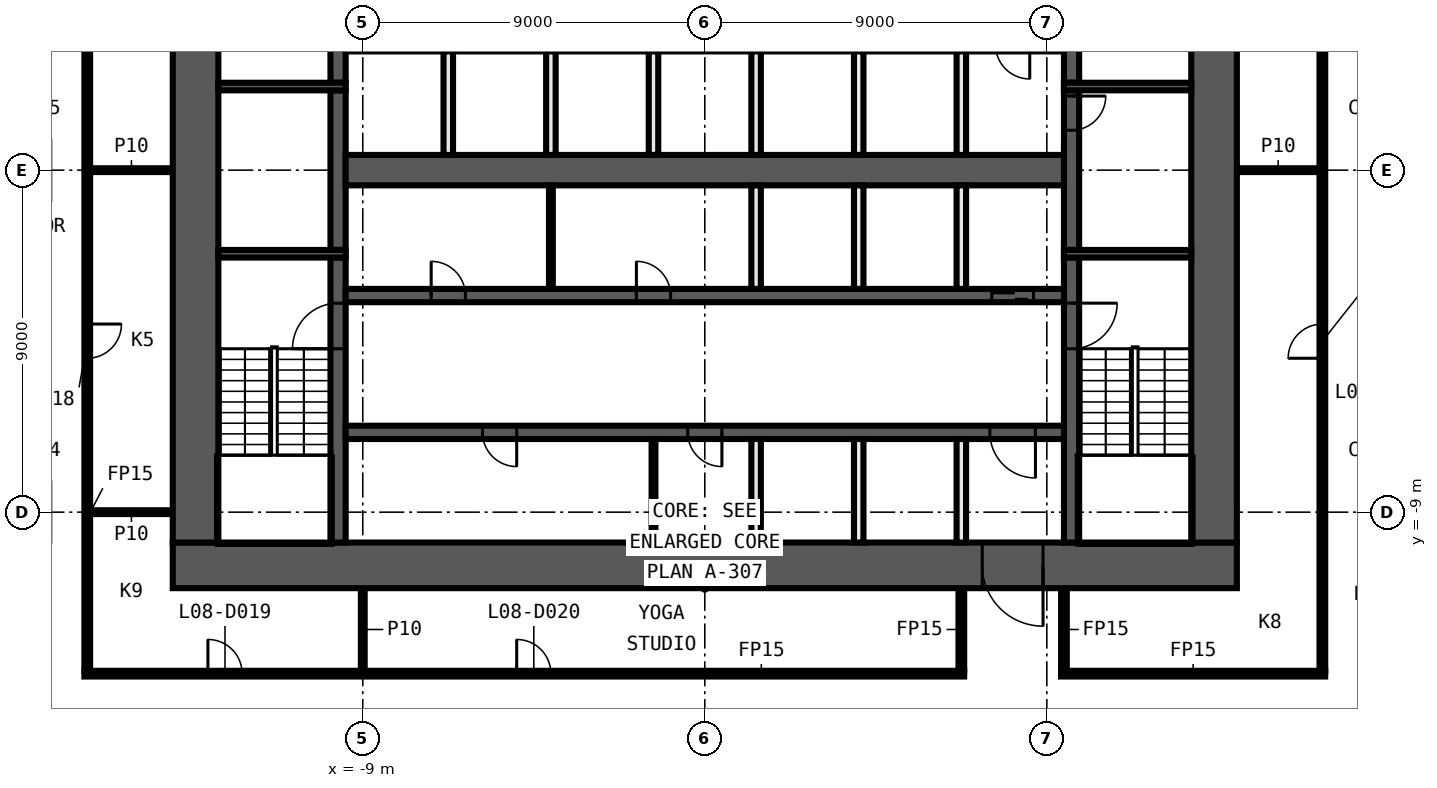
"""IFC4 building model, lengths in metres.
Left out: names, types, materials, properties, quantities, classifications, styles, units other than length and angle.
Written with IfcOpenShell. Run it as: python <this file> out.ifc"""

import sys

from ifc_helpers import new_model, si_unit, direction, frame, frame_2d, origin, place, context, subcontext, project, spatial, rectangle, extrude, element, fill, save


model = new_model("IFC4")
c1 = context("Model", 3, precision=1e-05, world=origin(), true_north=direction((0.0, 1.0)))
c2 = subcontext(c1, "Body", "Model", "MODEL_VIEW")
j1 = project(units=[si_unit("LENGTHUNIT", "METRE"), si_unit("PLANEANGLEUNIT", "RADIAN")], contexts=[c1])
p1 = place(None, origin())
s1 = spatial("IfcSite", under=j1, at=p1, CompositionType="ELEMENT")
p2 = place(p1, origin())
s2 = spatial("IfcBuilding", under=s1, at=p2, CompositionType="ELEMENT")
p3 = place(p2, frame((0.0, 0.0, 51.4)))
s3 = spatial("IfcBuildingStorey", under=s2, at=p3, CompositionType="ELEMENT", Elevation=51.4)
p4 = place(p3, frame((-16.325, -13.25, 0.0), z_axis=(0.0, 0.0, 1.0), x_axis=(1.0, 0.0, 0.0)))
e1 = element("IfcWall", 1, at=p4, inside=s3, PredefinedType="PARTITIONING", context=c2, shape_type="SweptSolid", body=[
    extrude(rectangle(XDim=23.15, YDim=0.15, at=frame_2d((11.575, 0.0))), origin(), (0.0, 0.0, 1.0), 3.3),
])
p5 = place(p4, frame((3.25, 0.0, 0.0)))
e2 = element("IfcOpeningElement", 2, at=p5, cuts=e1, PredefinedType="OPENING", context=c2, shape_type="SweptSolid", body=[
    extrude(rectangle(XDim=0.9, YDim=2.1, at=frame_2d((0.45, 1.05))), frame((0.0, 0.085, 0.0), z_axis=(0.0, -1.0, 0.0), x_axis=(1.0, 0.0, 0.0)), (0.0, 0.0, 1.0), 0.17),
])
p6 = place(p4, frame((11.375, 0.0, 0.0)))
e3 = element("IfcOpeningElement", 3, at=p6, cuts=e1, PredefinedType="OPENING", context=c2, shape_type="SweptSolid", body=[
    extrude(rectangle(XDim=0.9, YDim=2.1, at=frame_2d((0.45, 1.05))), frame((0.0, 0.085, 0.0), z_axis=(0.0, -1.0, 0.0), x_axis=(1.0, 0.0, 0.0)), (0.0, 0.0, 1.0), 0.17),
])
p7 = place(p3, frame((9.375, -13.25, 0.0), z_axis=(0.0, 0.0, 1.0), x_axis=(1.0, 0.0, 0.0)))
e4 = element("IfcWall", 4, at=p7, inside=s3, PredefinedType="PARTITIONING", context=c2, shape_type="SweptSolid", body=[
    extrude(rectangle(XDim=6.95, YDim=0.15, at=frame_2d((3.475, 0.0))), origin(), (0.0, 0.0, 1.0), 3.3),
])
for number, where, z_axis, x_axis in (
    (5, (-16.175, -9.0, 0.0), (0.0, 0.0, 1.0), (1.0, 0.0, 0.0)),
    (6, (-16.175, 0.0, 0.0), (0.0, 0.0, 1.0), (1.0, 0.0, 0.0)),
    (7, (14.0, 0.0, 0.0), (0.0, 0.0, 1.0), (1.0, 0.0, 0.0)),
):
    element("IfcWall", number, at=place(p3, frame(where, z_axis=z_axis, x_axis=x_axis)), inside=s3, PredefinedType="PARTITIONING", context=c2, shape_type="SweptSolid", body=[
        extrude(rectangle(XDim=2.175, YDim=0.1, at=frame_2d((1.087, 0.0))), origin(), (0.0, 0.0, 1.0), 3.3),
    ])
p8 = place(p3, frame((16.25, -13.175, 0.0), z_axis=(0.0, 0.0, 1.0), x_axis=(0.0, 1.0, 0.0)))
e8 = element("IfcWall", 8, at=p8, inside=s3, PredefinedType="PARTITIONING", context=c2, shape_type="SweptSolid", body=[
    extrude(rectangle(XDim=26.35, YDim=0.15, at=frame_2d((13.175, 0.0))), origin(), (0.0, 0.0, 1.0), 3.3),
])
p9 = place(p8, frame((8.225, 0.0, 0.0)))
e9 = element("IfcOpeningElement", 9, at=p9, cuts=e8, PredefinedType="OPENING", context=c2, shape_type="SweptSolid", body=[
    extrude(rectangle(XDim=0.9, YDim=2.1, at=frame_2d((0.45, 1.05))), frame((0.0, 0.085, 0.0), z_axis=(0.0, -1.0, 0.0), x_axis=(1.0, 0.0, 0.0)), (0.0, 0.0, 1.0), 0.17),
])
p10 = place(p8, frame((17.225, 0.0, 0.0)))
e10 = element("IfcOpeningElement", 10, at=p10, cuts=e8, PredefinedType="OPENING", context=c2, shape_type="SweptSolid", body=[
    extrude(rectangle(XDim=0.9, YDim=2.1, at=frame_2d((0.45, 1.05))), frame((0.0, 0.085, 0.0), z_axis=(0.0, -1.0, 0.0), x_axis=(1.0, 0.0, 0.0)), (0.0, 0.0, 1.0), 0.17),
])
for number, where, z_axis, x_axis in (
    (11, (9.45, -13.175, 0.0), (0.0, 0.0, 1.0), (0.0, 1.0, 0.0)),
    (12, (6.75, -13.175, 0.0), (0.0, 0.0, 1.0), (0.0, 1.0, 0.0)),
):
    element("IfcWall", number, at=place(p3, frame(where, z_axis=z_axis, x_axis=x_axis)), inside=s3, PredefinedType="PARTITIONING", context=c2, shape_type="SweptSolid", body=[
        extrude(rectangle(XDim=2.175, YDim=0.15, at=frame_2d((1.087, 0.0))), origin(), (0.0, 0.0, 1.0), 3.3),
    ])
p11 = place(p3, frame((-9.0, -13.175, 0.0), z_axis=(0.0, 0.0, 1.0), x_axis=(0.0, 1.0, 0.0)))
e13 = element("IfcWall", 13, at=p11, inside=s3, PredefinedType="PARTITIONING", context=c2, shape_type="SweptSolid", body=[
    extrude(rectangle(XDim=2.175, YDim=0.1, at=frame_2d((1.087, 0.0))), origin(), (0.0, 0.0, 1.0), 3.3),
])
p12 = place(p3, frame((-16.25, 13.175, 0.0), z_axis=(0.0, 0.0, 1.0), x_axis=(0.0, -1.0, 0.0)))
e14 = element("IfcWall", 14, at=p12, inside=s3, PredefinedType="PARTITIONING", context=c2, shape_type="SweptSolid", body=[
    extrude(rectangle(XDim=26.35, YDim=0.15, at=frame_2d((13.175, 0.0))), origin(), (0.0, 0.0, 1.0), 3.3),
])
p13 = place(p12, frame((17.225, 0.0, 0.0)))
e15 = element("IfcOpeningElement", 15, at=p13, cuts=e14, PredefinedType="OPENING", context=c2, shape_type="SweptSolid", body=[
    extrude(rectangle(XDim=0.9, YDim=2.1, at=frame_2d((0.45, 1.05))), frame((0.0, 0.085, 0.0), z_axis=(0.0, -1.0, 0.0), x_axis=(1.0, 0.0, 0.0)), (0.0, 0.0, 1.0), 0.17),
])
p14 = place(p12, frame((8.225, 0.0, 0.0)))
e16 = element("IfcOpeningElement", 16, at=p14, cuts=e14, PredefinedType="OPENING", context=c2, shape_type="SweptSolid", body=[
    extrude(rectangle(XDim=0.9, YDim=2.1, at=frame_2d((0.45, 1.05))), frame((0.0, 0.085, 0.0), z_axis=(0.0, -1.0, 0.0), x_axis=(1.0, 0.0, 0.0)), (0.0, 0.0, 1.0), 0.17),
])
p15 = place(p3, frame((14.0, -10.4, 0.0), z_axis=(0.0, 0.0, 1.0), x_axis=(-1.0, 0.0, 0.0)))
e17 = element("IfcWall", 17, at=p15, inside=s3, PredefinedType="SHEAR", context=c2, shape_type="SweptSolid", body=[
    extrude(rectangle(XDim=28.0, YDim=1.2, at=frame_2d((14.0, 0.0))), origin(), (0.0, 0.0, 1.0), 3.3),
])
p16 = place(p15, frame((5.1, 0.0, 0.0)))
e18 = element("IfcOpeningElement", 18, at=p16, cuts=e17, PredefinedType="OPENING", context=c2, shape_type="SweptSolid", body=[
    extrude(rectangle(XDim=1.6, YDim=2.1, at=frame_2d((0.8, 1.05))), frame((0.0, 0.61, 0.0), z_axis=(0.0, -1.0, 0.0), x_axis=(1.0, 0.0, 0.0)), (0.0, 0.0, 1.0), 1.22),
])
for number, where, z_axis, x_axis in (
    (19, (13.4, 9.8, 0.0), (0.0, 0.0, 1.0), (0.0, -1.0, 0.0)),
    (20, (-13.4, -9.8, 0.0), (0.0, 0.0, 1.0), (0.0, 1.0, 0.0)),
):
    element("IfcWall", number, at=place(p3, frame(where, z_axis=z_axis, x_axis=x_axis)), inside=s3, PredefinedType="SHEAR", context=c2, shape_type="SweptSolid", body=[
        extrude(rectangle(XDim=19.6, YDim=1.2, at=frame_2d((9.8, 0.0))), origin(), (0.0, 0.0, 1.0), 3.3),
    ])
p17 = place(p3, frame((9.65, -2.3, 0.0), z_axis=(0.0, 0.0, 1.0), x_axis=(0.0, -1.0, 0.0)))
e21 = element("IfcWall", 21, at=p17, inside=s3, PredefinedType="SHEAR", context=c2, shape_type="SweptSolid", body=[
    extrude(rectangle(XDim=7.5, YDim=0.4, at=frame_2d((3.75, 0.0))), origin(), (0.0, 0.0, 1.0), 3.3),
])
p18 = place(p17, frame((1.2, 0.0, 0.0)))
e22 = element("IfcOpeningElement", 22, at=p18, cuts=e21, PredefinedType="OPENING", context=c2, shape_type="SweptSolid", body=[
    extrude(rectangle(XDim=1.2, YDim=2.1, at=frame_2d((0.6, 1.05))), frame((0.0, 0.21, 0.0), z_axis=(0.0, -1.0, 0.0), x_axis=(1.0, 0.0, 0.0)), (0.0, 0.0, 1.0), 0.42),
])
p19 = place(p3, frame((9.65, 2.1, 0.0), z_axis=(0.0, 0.0, 1.0), x_axis=(0.0, -1.0, 0.0)))
e23 = element("IfcWall", 23, at=p19, inside=s3, PredefinedType="SHEAR", context=c2, shape_type="SweptSolid", body=[
    extrude(rectangle(XDim=4.2, YDim=0.4, at=frame_2d((2.1, 0.0))), origin(), (0.0, 0.0, 1.0), 3.3),
])
p20 = place(p19, frame((0.15, 0.0, 0.0)))
e24 = element("IfcOpeningElement", 24, at=p20, cuts=e23, PredefinedType="OPENING", context=c2, shape_type="SweptSolid", body=[
    extrude(rectangle(XDim=0.9, YDim=2.1, at=frame_2d((0.45, 1.05))), frame((0.0, 0.21, 0.0), z_axis=(0.0, -1.0, 0.0), x_axis=(1.0, 0.0, 0.0)), (0.0, 0.0, 1.0), 0.42),
])
p21 = place(p3, frame((9.65, 9.8, 0.0), z_axis=(0.0, 0.0, 1.0), x_axis=(0.0, -1.0, 0.0)))
e25 = element("IfcWall", 25, at=p21, inside=s3, PredefinedType="SHEAR", context=c2, shape_type="SweptSolid", body=[
    extrude(rectangle(XDim=7.5, YDim=0.4, at=frame_2d((3.75, 0.0))), origin(), (0.0, 0.0, 1.0), 3.3),
])
p22 = place(p21, frame((5.1, 0.0, 0.0)))
e26 = element("IfcOpeningElement", 26, at=p22, cuts=e25, PredefinedType="OPENING", context=c2, shape_type="SweptSolid", body=[
    extrude(rectangle(XDim=1.2, YDim=2.1, at=frame_2d((0.6, 1.05))), frame((0.0, 0.21, 0.0), z_axis=(0.0, -1.0, 0.0), x_axis=(1.0, 0.0, 0.0)), (0.0, 0.0, 1.0), 0.42),
])
p23 = place(p3, frame((-9.65, -9.8, 0.0), z_axis=(0.0, 0.0, 1.0), x_axis=(0.0, 1.0, 0.0)))
e27 = element("IfcWall", 27, at=p23, inside=s3, PredefinedType="SHEAR", context=c2, shape_type="SweptSolid", body=[
    extrude(rectangle(XDim=7.5, YDim=0.4, at=frame_2d((3.75, 0.0))), origin(), (0.0, 0.0, 1.0), 3.3),
])
p24 = place(p23, frame((5.1, 0.0, 0.0)))
e28 = element("IfcOpeningElement", 28, at=p24, cuts=e27, PredefinedType="OPENING", context=c2, shape_type="SweptSolid", body=[
    extrude(rectangle(XDim=1.2, YDim=2.1, at=frame_2d((0.6, 1.05))), frame((0.0, 0.21, 0.0), z_axis=(0.0, -1.0, 0.0), x_axis=(1.0, 0.0, 0.0)), (0.0, 0.0, 1.0), 0.42),
])
p25 = place(p3, frame((-9.65, -2.1, 0.0), z_axis=(0.0, 0.0, 1.0), x_axis=(0.0, 1.0, 0.0)))
e29 = element("IfcWall", 29, at=p25, inside=s3, PredefinedType="SHEAR", context=c2, shape_type="SweptSolid", body=[
    extrude(rectangle(XDim=4.2, YDim=0.4, at=frame_2d((2.1, 0.0))), origin(), (0.0, 0.0, 1.0), 3.3),
])
p26 = place(p3, frame((-9.65, 2.3, 0.0), z_axis=(0.0, 0.0, 1.0), x_axis=(0.0, 1.0, 0.0)))
e30 = element("IfcWall", 30, at=p26, inside=s3, PredefinedType="SHEAR", context=c2, shape_type="SweptSolid", body=[
    extrude(rectangle(XDim=7.5, YDim=0.4, at=frame_2d((3.75, 0.0))), origin(), (0.0, 0.0, 1.0), 3.3),
])
p27 = place(p26, frame((1.2, 0.0, 0.0)))
e31 = element("IfcOpeningElement", 31, at=p27, cuts=e30, PredefinedType="OPENING", context=c2, shape_type="SweptSolid", body=[
    extrude(rectangle(XDim=1.2, YDim=2.1, at=frame_2d((0.6, 1.05))), frame((0.0, 0.21, 0.0), z_axis=(0.0, -1.0, 0.0), x_axis=(1.0, 0.0, 0.0)), (0.0, 0.0, 1.0), 0.42),
])
for number, where, z_axis, x_axis in (
    (32, (9.45, 2.2, 0.0), (0.0, 0.0, 1.0), (1.0, 0.0, 0.0)),
    (33, (-9.45, 2.2, 0.0), (0.0, 0.0, 1.0), (-1.0, 0.0, 0.0)),
    (34, (9.45, -2.2, 0.0), (0.0, 0.0, 1.0), (1.0, 0.0, 0.0)),
    (35, (-9.45, -2.2, 0.0), (0.0, 0.0, 1.0), (-1.0, 0.0, 0.0)),
):
    element("IfcWall", number, at=place(p3, frame(where, z_axis=z_axis, x_axis=x_axis)), inside=s3, PredefinedType="SHEAR", context=c2, shape_type="SweptSolid", body=[
        extrude(rectangle(XDim=3.35, YDim=0.2, at=frame_2d((1.675, 0.0))), origin(), (0.0, 0.0, 1.0), 3.3),
    ])
p28 = place(p3, frame((-9.45, -3.3, 0.0), z_axis=(0.0, 0.0, 1.0), x_axis=(1.0, 0.0, 0.0)))
e36 = element("IfcWall", 36, at=p28, inside=s3, PredefinedType="SHEAR", context=c2, shape_type="SweptSolid", body=[
    extrude(rectangle(XDim=18.9, YDim=0.35, at=frame_2d((9.45, 0.0))), origin(), (0.0, 0.0, 1.0), 3.3),
])
p29 = place(p28, frame((17.0, 0.0, 0.0)))
e37 = element("IfcOpeningElement", 37, at=p29, cuts=e36, PredefinedType="OPENING", context=c2, shape_type="SweptSolid", body=[
    extrude(rectangle(XDim=1.1, YDim=2.1, at=frame_2d((0.55, 1.05))), frame((0.0, 0.185, 0.0), z_axis=(0.0, -1.0, 0.0), x_axis=(1.0, 0.0, 0.0)), (0.0, 0.0, 1.0), 0.37),
])
p30 = place(p28, frame((2.25, 0.0, 0.0)))
e38 = element("IfcOpeningElement", 38, at=p30, cuts=e36, PredefinedType="OPENING", context=c2, shape_type="SweptSolid", body=[
    extrude(rectangle(XDim=0.9, YDim=2.1, at=frame_2d((0.45, 1.05))), frame((0.0, 0.185, 0.0), z_axis=(0.0, -1.0, 0.0), x_axis=(1.0, 0.0, 0.0)), (0.0, 0.0, 1.0), 0.37),
])
p31 = place(p28, frame((7.65, 0.0, 0.0)))
e39 = element("IfcOpeningElement", 39, at=p31, cuts=e36, PredefinedType="OPENING", context=c2, shape_type="SweptSolid", body=[
    extrude(rectangle(XDim=0.9, YDim=2.1, at=frame_2d((0.45, 1.05))), frame((0.0, 0.185, 0.0), z_axis=(0.0, -1.0, 0.0), x_axis=(1.0, 0.0, 0.0)), (0.0, 0.0, 1.0), 0.37),
])
p32 = place(p3, frame((9.45, -6.9, 0.0), z_axis=(0.0, 0.0, 1.0), x_axis=(-1.0, 0.0, 0.0)))
e40 = element("IfcWall", 40, at=p32, inside=s3, PredefinedType="SHEAR", context=c2, shape_type="SweptSolid", body=[
    extrude(rectangle(XDim=18.9, YDim=0.35, at=frame_2d((9.45, 0.0))), origin(), (0.0, 0.0, 1.0), 3.3),
])
p33 = place(p32, frame((0.75, 0.0, 0.0)))
e41 = element("IfcOpeningElement", 41, at=p33, cuts=e40, PredefinedType="OPENING", context=c2, shape_type="SweptSolid", body=[
    extrude(rectangle(XDim=1.2, YDim=2.1, at=frame_2d((0.6, 1.05))), frame((0.0, 0.185, 0.0), z_axis=(0.0, -1.0, 0.0), x_axis=(1.0, 0.0, 0.0)), (0.0, 0.0, 1.0), 0.37),
])
p34 = place(p32, frame((14.4, 0.0, 0.0)))
e42 = element("IfcOpeningElement", 42, at=p34, cuts=e40, PredefinedType="OPENING", context=c2, shape_type="SweptSolid", body=[
    extrude(rectangle(XDim=0.9, YDim=2.1, at=frame_2d((0.45, 1.05))), frame((0.0, 0.185, 0.0), z_axis=(0.0, -1.0, 0.0), x_axis=(1.0, 0.0, 0.0)), (0.0, 0.0, 1.0), 0.37),
])
p35 = place(p32, frame((9.0, 0.0, 0.0)))
e43 = element("IfcOpeningElement", 43, at=p35, cuts=e40, PredefinedType="OPENING", context=c2, shape_type="SweptSolid", body=[
    extrude(rectangle(XDim=0.9, YDim=2.1, at=frame_2d((0.45, 1.05))), frame((0.0, 0.185, 0.0), z_axis=(0.0, -1.0, 0.0), x_axis=(1.0, 0.0, 0.0)), (0.0, 0.0, 1.0), 0.37),
])
p36 = place(p3, frame((-9.45, 0.0, 0.0), z_axis=(0.0, 0.0, 1.0), x_axis=(1.0, 0.0, 0.0)))
e44 = element("IfcWall", 44, at=p36, inside=s3, PredefinedType="SHEAR", context=c2, shape_type="SweptSolid", body=[
    extrude(rectangle(XDim=18.9, YDim=0.8, at=frame_2d((9.45, 0.0))), origin(), (0.0, 0.0, 1.0), 3.3),
])
for number, where, z_axis, x_axis in (
    (45, (6.75, -9.8, 0.0), (0.0, 0.0, 1.0), (0.0, 1.0, 0.0)),
    (46, (6.75, -3.125, 0.0), (0.0, 0.0, 1.0), (0.0, 1.0, 0.0)),
    (47, (6.75, 0.4, 0.0), (0.0, 0.0, 1.0), (0.0, 1.0, 0.0)),
    (48, (4.05, -9.8, 0.0), (0.0, 0.0, 1.0), (0.0, 1.0, 0.0)),
    (49, (4.05, -3.125, 0.0), (0.0, 0.0, 1.0), (0.0, 1.0, 0.0)),
    (50, (4.05, 0.4, 0.0), (0.0, 0.0, 1.0), (0.0, 1.0, 0.0)),
    (51, (1.35, -9.8, 0.0), (0.0, 0.0, 1.0), (0.0, 1.0, 0.0)),
    (52, (1.35, -3.125, 0.0), (0.0, 0.0, 1.0), (0.0, 1.0, 0.0)),
    (53, (1.35, 0.4, 0.0), (0.0, 0.0, 1.0), (0.0, 1.0, 0.0)),
):
    element("IfcWall", number, at=place(p3, frame(where, z_axis=z_axis, x_axis=x_axis)), inside=s3, PredefinedType="SOLIDWALL", context=c2, shape_type="SweptSolid", body=[
        extrude(rectangle(XDim=2.725, YDim=0.25, at=frame_2d((1.363, 0.0))), origin(), (0.0, 0.0, 1.0), 3.3),
    ])
p37 = place(p3, frame((-1.35, -9.8, 0.0), z_axis=(0.0, 0.0, 1.0), x_axis=(0.0, 1.0, 0.0)))
e54 = element("IfcWall", 54, at=p37, inside=s3, PredefinedType="PARTITIONING", context=c2, shape_type="SweptSolid", body=[
    extrude(rectangle(XDim=2.725, YDim=0.1, at=frame_2d((1.363, 0.0))), origin(), (0.0, 0.0, 1.0), 3.3),
])
p38 = place(p3, frame((-1.35, 0.4, 0.0), z_axis=(0.0, 0.0, 1.0), x_axis=(0.0, 1.0, 0.0)))
e55 = element("IfcWall", 55, at=p38, inside=s3, PredefinedType="SOLIDWALL", context=c2, shape_type="SweptSolid", body=[
    extrude(rectangle(XDim=2.725, YDim=0.25, at=frame_2d((1.363, 0.0))), origin(), (0.0, 0.0, 1.0), 3.3),
])
p39 = place(p3, frame((-4.05, -3.125, 0.0), z_axis=(0.0, 0.0, 1.0), x_axis=(0.0, 1.0, 0.0)))
e56 = element("IfcWall", 56, at=p39, inside=s3, PredefinedType="PARTITIONING", context=c2, shape_type="SweptSolid", body=[
    extrude(rectangle(XDim=2.725, YDim=0.1, at=frame_2d((1.363, 0.0))), origin(), (0.0, 0.0, 1.0), 3.3),
])
for number, where, z_axis, x_axis in (
    (57, (-4.05, 0.4, 0.0), (0.0, 0.0, 1.0), (0.0, 1.0, 0.0)),
    (58, (-6.75, 0.4, 0.0), (0.0, 0.0, 1.0), (0.0, 1.0, 0.0)),
):
    element("IfcWall", number, at=place(p3, frame(where, z_axis=z_axis, x_axis=x_axis)), inside=s3, PredefinedType="SOLIDWALL", context=c2, shape_type="SweptSolid", body=[
        extrude(rectangle(XDim=2.725, YDim=0.25, at=frame_2d((1.363, 0.0))), origin(), (0.0, 0.0, 1.0), 3.3),
    ])
p40 = place(p13, origin())
e59 = element("IfcDoor", 59, at=p40, inside=s3, OperationType="SINGLE_SWING_RIGHT", PredefinedType="DOOR", context=c2, shape_type="SweptSolid", body=[
    extrude(rectangle(XDim=0.9, YDim=2.1, at=frame_2d((0.45, 1.05))), frame((0.0, 0.025, 0.0), z_axis=(0.0, -1.0, 0.0), x_axis=(1.0, 0.0, 0.0)), (0.0, 0.0, 1.0), 0.05),
])
fill(e15, e59)
p41 = place(p5, origin())
e60 = element("IfcDoor", 60, at=p41, inside=s3, OperationType="SINGLE_SWING_LEFT", PredefinedType="DOOR", context=c2, shape_type="SweptSolid", body=[
    extrude(rectangle(XDim=0.9, YDim=2.1, at=frame_2d((0.45, 1.05))), frame((0.0, 0.025, 0.0), z_axis=(0.0, -1.0, 0.0), x_axis=(1.0, 0.0, 0.0)), (0.0, 0.0, 1.0), 0.05),
])
fill(e2, e60)
p42 = place(p6, origin())
e61 = element("IfcDoor", 61, at=p42, inside=s3, OperationType="SINGLE_SWING_RIGHT", PredefinedType="DOOR", context=c2, shape_type="SweptSolid", body=[
    extrude(rectangle(XDim=0.9, YDim=2.1, at=frame_2d((0.45, 1.05))), frame((0.0, 0.025, 0.0), z_axis=(0.0, -1.0, 0.0), x_axis=(1.0, 0.0, 0.0)), (0.0, 0.0, 1.0), 0.05),
])
fill(e3, e61)
p43 = place(p9, origin())
e62 = element("IfcDoor", 62, at=p43, inside=s3, OperationType="SINGLE_SWING_LEFT", PredefinedType="DOOR", context=c2, shape_type="SweptSolid", body=[
    extrude(rectangle(XDim=0.9, YDim=2.1, at=frame_2d((0.45, 1.05))), frame((0.0, 0.025, 0.0), z_axis=(0.0, -1.0, 0.0), x_axis=(1.0, 0.0, 0.0)), (0.0, 0.0, 1.0), 0.05),
])
fill(e9, e62)
p44 = place(p20, origin())
e63 = element("IfcDoor", 63, at=p44, inside=s3, OperationType="SINGLE_SWING_RIGHT", PredefinedType="DOOR", context=c2, shape_type="SweptSolid", body=[
    extrude(rectangle(XDim=0.9, YDim=2.1, at=frame_2d((0.45, 1.05))), frame((0.0, 0.025, 0.0), z_axis=(0.0, -1.0, 0.0), x_axis=(1.0, 0.0, 0.0)), (0.0, 0.0, 1.0), 0.05),
])
fill(e24, e63)
p45 = place(p29, origin())
e64 = element("IfcDoor", 64, at=p45, inside=s3, OperationType="DOUBLE_DOOR_SLIDING", PredefinedType="DOOR", context=c2, shape_type="SweptSolid", body=[
    extrude(rectangle(XDim=1.1, YDim=2.1, at=frame_2d((0.55, 1.05))), frame((0.0, 0.025, 0.0), z_axis=(0.0, -1.0, 0.0), x_axis=(1.0, 0.0, 0.0)), (0.0, 0.0, 1.0), 0.05),
])
fill(e37, e64)
p46 = place(p16, origin())
e65 = element("IfcDoor", 65, at=p46, inside=s3, OperationType="DOUBLE_DOOR_SINGLE_SWING", PredefinedType="DOOR", context=c2, shape_type="SweptSolid", body=[
    extrude(rectangle(XDim=1.6, YDim=2.1, at=frame_2d((0.8, 1.05))), frame((0.0, 0.025, 0.0), z_axis=(0.0, -1.0, 0.0), x_axis=(1.0, 0.0, 0.0)), (0.0, 0.0, 1.0), 0.05),
])
fill(e18, e65)
p47 = place(p33, origin())
e66 = element("IfcDoor", 66, at=p47, inside=s3, OperationType="SINGLE_SWING_LEFT", PredefinedType="DOOR", context=c2, shape_type="SweptSolid", body=[
    extrude(rectangle(XDim=1.2, YDim=2.1, at=frame_2d((0.6, 1.05))), frame((0.0, 0.025, 0.0), z_axis=(0.0, -1.0, 0.0), x_axis=(1.0, 0.0, 0.0)), (0.0, 0.0, 1.0), 0.05),
])
fill(e41, e66)
p48 = place(p30, origin())
e67 = element("IfcDoor", 67, at=p48, inside=s3, OperationType="SINGLE_SWING_RIGHT", PredefinedType="DOOR", context=c2, shape_type="SweptSolid", body=[
    extrude(rectangle(XDim=0.9, YDim=2.1, at=frame_2d((0.45, 1.05))), frame((0.0, 0.025, 0.0), z_axis=(0.0, -1.0, 0.0), x_axis=(1.0, 0.0, 0.0)), (0.0, 0.0, 1.0), 0.05),
])
fill(e38, e67)
p49 = place(p31, origin())
e68 = element("IfcDoor", 68, at=p49, inside=s3, OperationType="SINGLE_SWING_LEFT", PredefinedType="DOOR", context=c2, shape_type="SweptSolid", body=[
    extrude(rectangle(XDim=0.9, YDim=2.1, at=frame_2d((0.45, 1.05))), frame((0.0, 0.025, 0.0), z_axis=(0.0, -1.0, 0.0), x_axis=(1.0, 0.0, 0.0)), (0.0, 0.0, 1.0), 0.05),
])
fill(e39, e68)
p50 = place(p34, origin())
e69 = element("IfcDoor", 69, at=p50, inside=s3, OperationType="SINGLE_SWING_RIGHT", PredefinedType="DOOR", context=c2, shape_type="SweptSolid", body=[
    extrude(rectangle(XDim=0.9, YDim=2.1, at=frame_2d((0.45, 1.05))), frame((0.0, 0.025, 0.0), z_axis=(0.0, -1.0, 0.0), x_axis=(1.0, 0.0, 0.0)), (0.0, 0.0, 1.0), 0.05),
])
fill(e42, e69)
p51 = place(p35, origin())
e70 = element("IfcDoor", 70, at=p51, inside=s3, OperationType="SINGLE_SWING_LEFT", PredefinedType="DOOR", context=c2, shape_type="SweptSolid", body=[
    extrude(rectangle(XDim=0.9, YDim=2.1, at=frame_2d((0.45, 1.05))), frame((0.0, 0.025, 0.0), z_axis=(0.0, -1.0, 0.0), x_axis=(1.0, 0.0, 0.0)), (0.0, 0.0, 1.0), 0.05),
])
fill(e43, e70)
p52 = place(p18, origin())
e71 = element("IfcDoor", 71, at=p52, inside=s3, OperationType="SINGLE_SWING_RIGHT", PredefinedType="DOOR", context=c2, shape_type="SweptSolid", body=[
    extrude(rectangle(XDim=1.2, YDim=2.1, at=frame_2d((0.6, 1.05))), frame((0.0, 0.025, 0.0), z_axis=(0.0, -1.0, 0.0), x_axis=(1.0, 0.0, 0.0)), (0.0, 0.0, 1.0), 0.05),
])
fill(e22, e71)
p53 = place(p24, origin())
e72 = element("IfcDoor", 72, at=p53, inside=s3, OperationType="SINGLE_SWING_LEFT", PredefinedType="DOOR", context=c2, shape_type="SweptSolid", body=[
    extrude(rectangle(XDim=1.2, YDim=2.1, at=frame_2d((0.6, 1.05))), frame((0.0, 0.025, 0.0), z_axis=(0.0, -1.0, 0.0), x_axis=(1.0, 0.0, 0.0)), (0.0, 0.0, 1.0), 0.05),
])
fill(e28, e72)
save(model, sys.argv[1])
